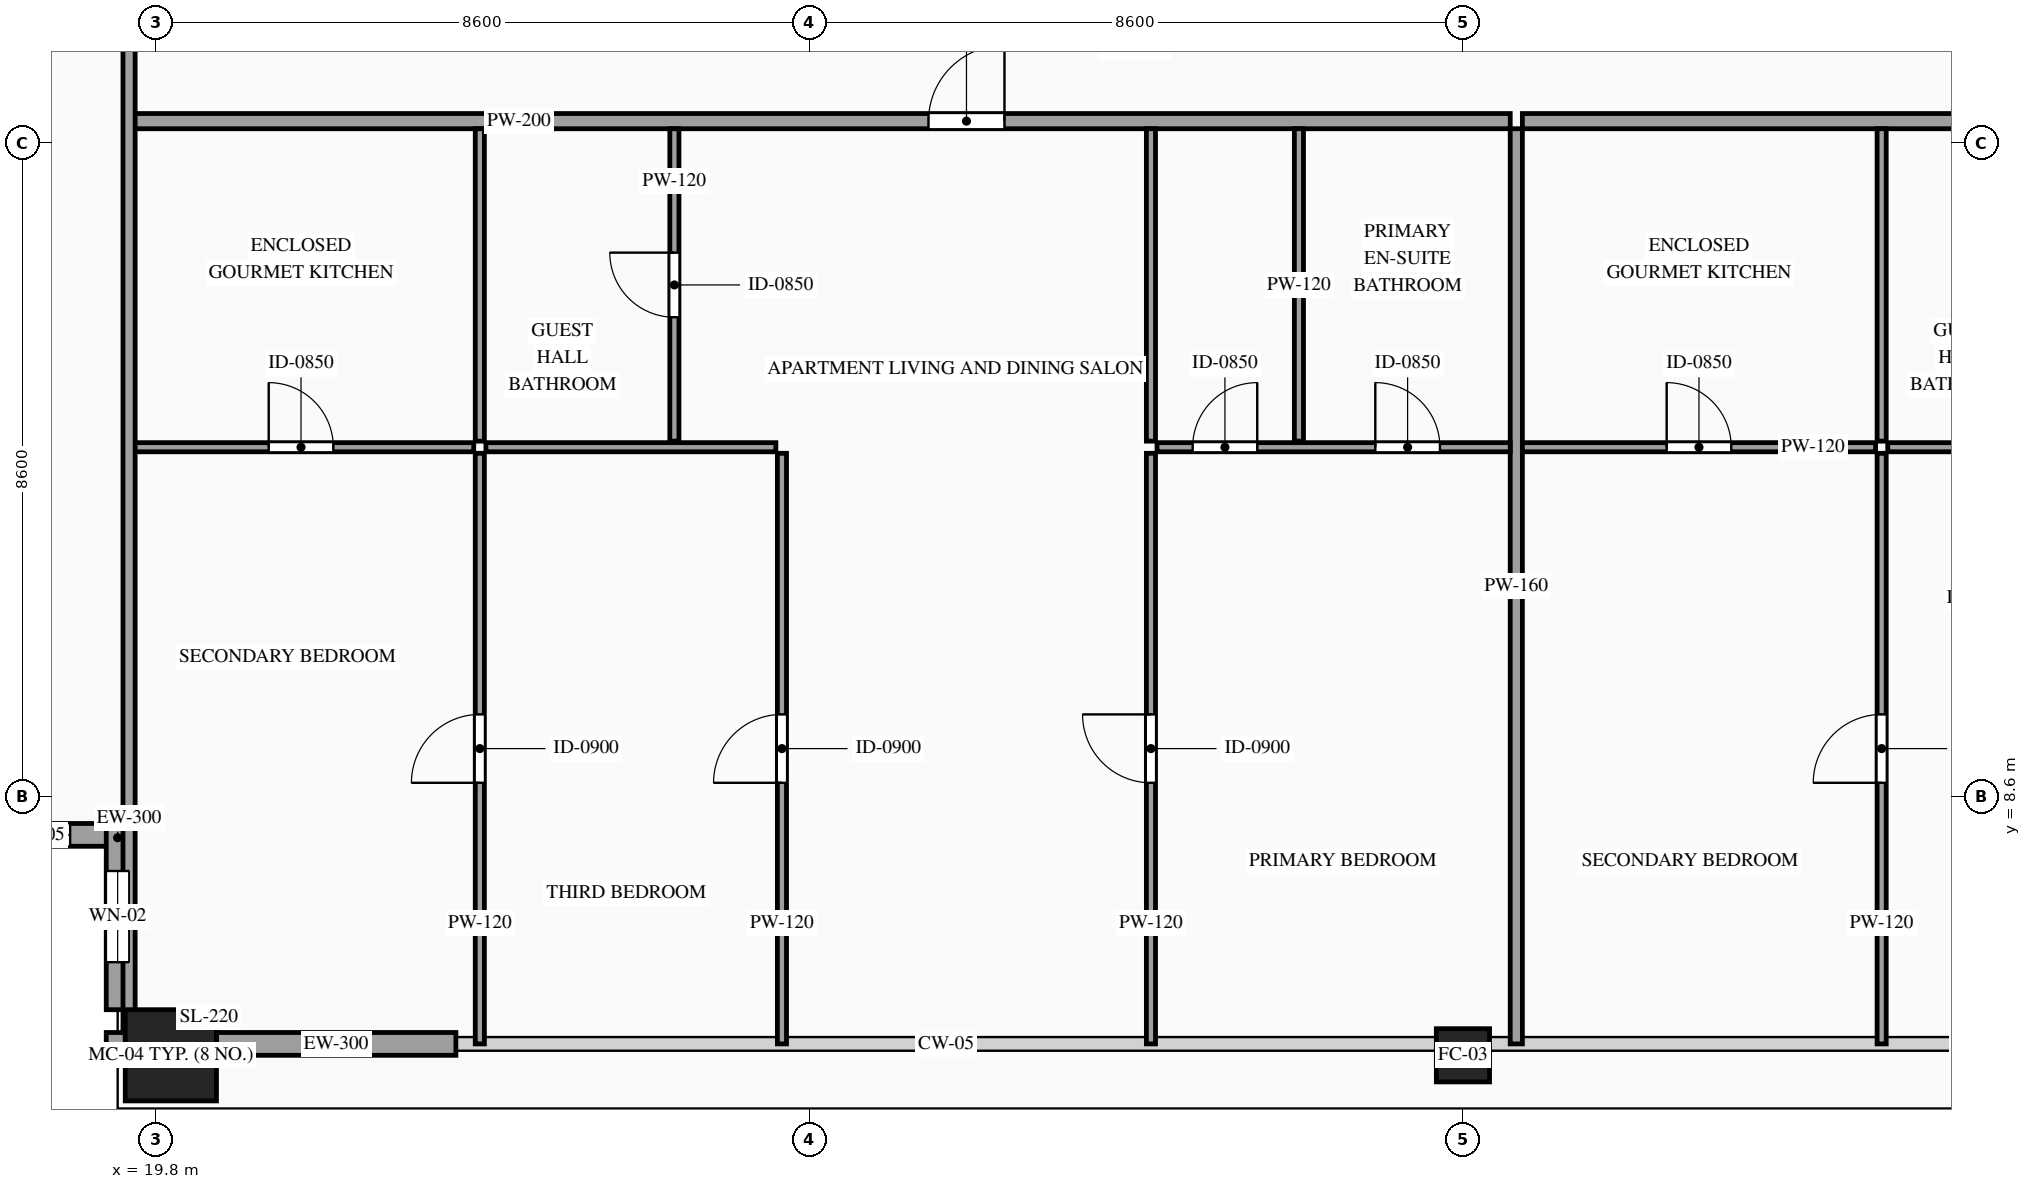
"""IFC4 building model, lengths in metres.
Left out: names, types, materials, properties, quantities, classifications, styles, units other than length and angle.
Written with IfcOpenShell. Run it as: python <this file> out.ifc"""

import sys

from ifc_helpers import new_model, si_unit, direction, frame, frame_2d, origin, origin_2d, place, context, subcontext, project, spatial, rectangle, hollow_rectangle, extrude, source, transform, mapped, element, fill, save


model = new_model("IFC4")
c1 = context("Model", 3, precision=1e-05, world=origin(), true_north=direction((0.0, 1.0)))
c2 = subcontext(c1, "Body", "Model", "MODEL_VIEW")
j1 = project(units=[si_unit("LENGTHUNIT", "METRE"), si_unit("PLANEANGLEUNIT", "RADIAN")], contexts=[c1])
p1 = place(None, origin())
s1 = spatial("IfcSite", under=j1, at=p1, CompositionType="ELEMENT")
p2 = place(p1, origin())
s2 = spatial("IfcBuilding", under=s1, at=p2, CompositionType="ELEMENT")
p3 = place(p2, frame((0.0, 0.0, 224.1)))
s3 = spatial("IfcBuildingStorey", under=s2, at=p3, CompositionType="ELEMENT", Elevation=224.1)
m1 = source(origin(), c2, "Body", "SweptSolid", [
    extrude(hollow_rectangle(XDim=1.2, YDim=1.2, WallThickness=0.055, at=origin_2d()), origin(), (0.0, 0.0, 1.0), 3.5),
])
p4 = place(p3, frame((20.0, 5.2, 0.0), z_axis=(0.0, 0.0, 1.0), x_axis=(1.0, 0.0, 0.0)))
e1 = element("IfcColumn", 1, at=p4, inside=s3, PredefinedType="COLUMN", context=c2, shape_type="MappedRepresentation", body=[
    mapped(m1, transform((0.0, 0.0, 0.0), scale=1.0)),
])
m2 = source(origin(), c2, "Body", "SweptSolid", [
    extrude(hollow_rectangle(XDim=0.7, YDim=0.7, WallThickness=0.032, at=origin_2d()), origin(), (0.0, 0.0, 1.0), 3.5),
])
p5 = place(p3, frame((37.0, 5.2, 0.0), z_axis=(0.0, 0.0, 1.0), x_axis=(1.0, 0.0, 0.0)))
e2 = element("IfcColumn", 2, at=p5, inside=s3, PredefinedType="COLUMN", context=c2, shape_type="MappedRepresentation", body=[
    mapped(m2, transform((0.0, 0.0, 0.0), scale=1.0)),
])
p6 = place(p3, frame((17.0, 8.1, 0.0), z_axis=(0.0, 0.0, 1.0), x_axis=(1.0, 0.0, 0.0)))
e3 = element("IfcWall", 3, at=p6, inside=s3, PredefinedType="SOLIDWALL", context=c2, shape_type="SweptSolid", body=[
    extrude(rectangle(XDim=2.45, YDim=0.3, at=frame_2d((1.225, 0.0))), origin(), (0.0, 0.0, 1.0), 3.28),
])
p7 = place(p6, frame((0.775, 0.0, 0.85)))
e4 = element("IfcOpeningElement", 4, at=p7, cuts=e3, PredefinedType="OPENING", context=c2, shape_type="SweptSolid", body=[
    extrude(rectangle(XDim=0.9, YDim=1.5, at=frame_2d((0.45, 0.75))), frame((0.0, 0.165, 0.0), z_axis=(0.0, -1.0, 0.0), x_axis=(1.0, 0.0, 0.0)), (0.0, 0.0, 1.0), 0.33),
])
p8 = place(p3, frame((19.3, 8.25, 0.0), z_axis=(0.0, 0.0, 1.0), x_axis=(0.0, -1.0, 0.0)))
e5 = element("IfcWall", 5, at=p8, inside=s3, PredefinedType="SOLIDWALL", context=c2, shape_type="SweptSolid", body=[
    extrude(rectangle(XDim=2.45, YDim=0.3, at=frame_2d((1.225, 0.0))), origin(), (0.0, 0.0, 1.0), 3.28),
])
p9 = place(p8, frame((0.625, 0.0, 0.85)))
e6 = element("IfcOpeningElement", 6, at=p9, cuts=e5, PredefinedType="OPENING", context=c2, shape_type="SweptSolid", body=[
    extrude(rectangle(XDim=1.2, YDim=2.1, at=frame_2d((0.6, 1.05))), frame((0.0, 0.165, 0.0), z_axis=(0.0, -1.0, 0.0), x_axis=(1.0, 0.0, 0.0)), (0.0, 0.0, 1.0), 0.33),
])
m3 = source(origin(), c2, "Body", "SweptSolid", [
    extrude(rectangle(XDim=0.25, YDim=0.3, at=frame_2d((0.125, 0.0))), origin(), (0.0, 0.0, 1.0), 3.28),
])
p10 = place(p3, frame((19.15, 5.35, 0.0), z_axis=(0.0, 0.0, 1.0), x_axis=(1.0, 0.0, 0.0)))
e7 = element("IfcWall", 7, at=p10, inside=s3, PredefinedType="SOLIDWALL", context=c2, shape_type="MappedRepresentation", body=[
    mapped(m3, transform((0.0, 0.0, 0.0), scale=1.0)),
])
m4 = source(origin(), c2, "Body", "SweptSolid", [
    extrude(rectangle(XDim=3.15, YDim=0.3, at=frame_2d((1.575, 0.0))), origin(), (0.0, 0.0, 1.0), 2.835),
])
p11 = place(p3, frame((20.6, 5.35, 0.0), z_axis=(0.0, 0.0, 1.0), x_axis=(1.0, 0.0, 0.0)))
e8 = element("IfcWall", 8, at=p11, inside=s3, PredefinedType="SOLIDWALL", context=c2, shape_type="MappedRepresentation", body=[
    mapped(m4, transform((0.0, 0.0, 0.0), scale=1.0)),
])
p12 = place(p3, frame((19.44, 17.49, 0.0), z_axis=(0.0, 0.0, 1.0), x_axis=(1.0, 0.0, 0.0)))
e9 = element("IfcWall", 9, at=p12, inside=s3, PredefinedType="PARTITIONING", context=c2, shape_type="SweptSolid", body=[
    extrude(rectangle(XDim=18.182, YDim=0.2, at=frame_2d((9.091, 0.0))), origin(), (0.0, 0.0, 1.0), 3.28),
])
p13 = place(p12, frame((10.528, 0.0, 0.0)))
e10 = element("IfcOpeningElement", 10, at=p13, cuts=e9, PredefinedType="OPENING", context=c2, shape_type="SweptSolid", body=[
    extrude(rectangle(XDim=1.0, YDim=2.2, at=frame_2d((0.5, 1.1))), frame((0.0, 0.115, 0.0), z_axis=(0.0, -1.0, 0.0), x_axis=(1.0, 0.0, 0.0)), (0.0, 0.0, 1.0), 0.23),
])
m5 = source(origin(), c2, "Body", "SweptSolid", [
    extrude(rectangle(XDim=12.04, YDim=0.16, at=frame_2d((6.02, 0.0))), origin(), (0.0, 0.0, 1.0), 3.28),
])
p14 = place(p3, frame((37.702, 5.35, 0.0), z_axis=(0.0, 0.0, 1.0), x_axis=(0.0, 1.0, 0.0)))
e11 = element("IfcWall", 11, at=p14, inside=s3, PredefinedType="PARTITIONING", context=c2, shape_type="MappedRepresentation", body=[
    mapped(m5, transform((0.0, 0.0, 0.0), scale=1.0)),
])
p15 = place(p3, frame((19.44, 13.2, 0.0), z_axis=(0.0, 0.0, 1.0), x_axis=(1.0, 0.0, 0.0)))
e12 = element("IfcWall", 12, at=p15, inside=s3, PredefinedType="PARTITIONING", context=c2, shape_type="SweptSolid", body=[
    extrude(rectangle(XDim=4.545, YDim=0.12, at=frame_2d((2.272, 0.0))), origin(), (0.0, 0.0, 1.0), 3.28),
])
p16 = place(p15, frame((1.847, 0.0, 0.0)))
e13 = element("IfcOpeningElement", 13, at=p16, cuts=e12, PredefinedType="OPENING", context=c2, shape_type="SweptSolid", body=[
    extrude(rectangle(XDim=0.85, YDim=2.1, at=frame_2d((0.425, 1.05))), frame((0.0, 0.075, 0.0), z_axis=(0.0, -1.0, 0.0), x_axis=(1.0, 0.0, 0.0)), (0.0, 0.0, 1.0), 0.15),
])
m6 = source(origin(), c2, "Body", "SweptSolid", [
    extrude(rectangle(XDim=4.11, YDim=0.12, at=frame_2d((2.055, 0.0))), origin(), (0.0, 0.0, 1.0), 3.28),
])
p17 = place(p3, frame((24.065, 13.28, 0.0), z_axis=(0.0, 0.0, 1.0), x_axis=(0.0, 1.0, 0.0)))
e14 = element("IfcWall", 14, at=p17, inside=s3, PredefinedType="PARTITIONING", context=c2, shape_type="MappedRepresentation", body=[
    mapped(m6, transform((0.0, 0.0, 0.0), scale=1.0)),
])
p18 = place(p3, frame((26.625, 13.28, 0.0), z_axis=(0.0, 0.0, 1.0), x_axis=(0.0, 1.0, 0.0)))
e15 = element("IfcWall", 15, at=p18, inside=s3, PredefinedType="PARTITIONING", context=c2, shape_type="SweptSolid", body=[
    extrude(rectangle(XDim=4.11, YDim=0.12, at=frame_2d((2.055, 0.0))), origin(), (0.0, 0.0, 1.0), 3.28),
])
p19 = place(p18, frame((1.63, 0.0, 0.0)))
e16 = element("IfcOpeningElement", 16, at=p19, cuts=e15, PredefinedType="OPENING", context=c2, shape_type="SweptSolid", body=[
    extrude(rectangle(XDim=0.85, YDim=2.1, at=frame_2d((0.425, 1.05))), frame((0.0, 0.075, 0.0), z_axis=(0.0, -1.0, 0.0), x_axis=(1.0, 0.0, 0.0)), (0.0, 0.0, 1.0), 0.15),
])
for number, where, z_axis, x_axis in (
    (17, (34.842, 13.28, 0.0), (0.0, 0.0, 1.0), (0.0, 1.0, 0.0)),
    (18, (32.895, 13.28, 0.0), (0.0, 0.0, 1.0), (0.0, 1.0, 0.0)),
):
    element("IfcWall", number, at=place(p3, frame(where, z_axis=z_axis, x_axis=x_axis)), inside=s3, PredefinedType="PARTITIONING", context=c2, shape_type="MappedRepresentation", body=[
        mapped(m6, transform((0.0, 0.0, 0.0), scale=1.0)),
    ])
p20 = place(p3, frame((24.065, 5.35, 0.0), z_axis=(0.0, 0.0, 1.0), x_axis=(0.0, 1.0, 0.0)))
e19 = element("IfcWall", 19, at=p20, inside=s3, PredefinedType="PARTITIONING", context=c2, shape_type="SweptSolid", body=[
    extrude(rectangle(XDim=7.77, YDim=0.12, at=frame_2d((3.885, 0.0))), origin(), (0.0, 0.0, 1.0), 3.28),
])
p21 = place(p20, frame((3.435, 0.0, 0.0)))
e20 = element("IfcOpeningElement", 20, at=p21, cuts=e19, PredefinedType="OPENING", context=c2, shape_type="SweptSolid", body=[
    extrude(rectangle(XDim=0.9, YDim=2.15, at=frame_2d((0.45, 1.075))), frame((0.0, 0.075, 0.0), z_axis=(0.0, -1.0, 0.0), x_axis=(1.0, 0.0, 0.0)), (0.0, 0.0, 1.0), 0.15),
])
p22 = place(p3, frame((32.975, 13.2, 0.0), z_axis=(0.0, 0.0, 1.0), x_axis=(1.0, 0.0, 0.0)))
e21 = element("IfcWall", 21, at=p22, inside=s3, PredefinedType="PARTITIONING", context=c2, shape_type="SweptSolid", body=[
    extrude(rectangle(XDim=4.647, YDim=0.12, at=frame_2d((2.323, 0.0))), origin(), (0.0, 0.0, 1.0), 3.28),
])
p23 = place(p22, frame((2.872, 0.0, 0.0)))
e22 = element("IfcOpeningElement", 22, at=p23, cuts=e21, PredefinedType="OPENING", context=c2, shape_type="SweptSolid", body=[
    extrude(rectangle(XDim=0.85, YDim=2.1, at=frame_2d((0.425, 1.05))), frame((0.0, 0.075, 0.0), z_axis=(0.0, -1.0, 0.0), x_axis=(1.0, 0.0, 0.0)), (0.0, 0.0, 1.0), 0.15),
])
p24 = place(p22, frame((0.469, 0.0, 0.0)))
e23 = element("IfcOpeningElement", 23, at=p24, cuts=e21, PredefinedType="OPENING", context=c2, shape_type="SweptSolid", body=[
    extrude(rectangle(XDim=0.85, YDim=2.1, at=frame_2d((0.425, 1.05))), frame((0.0, 0.075, 0.0), z_axis=(0.0, -1.0, 0.0), x_axis=(1.0, 0.0, 0.0)), (0.0, 0.0, 1.0), 0.15),
])
p25 = place(p3, frame((32.895, 5.35, 0.0), z_axis=(0.0, 0.0, 1.0), x_axis=(0.0, 1.0, 0.0)))
e24 = element("IfcWall", 24, at=p25, inside=s3, PredefinedType="PARTITIONING", context=c2, shape_type="SweptSolid", body=[
    extrude(rectangle(XDim=7.77, YDim=0.12, at=frame_2d((3.885, 0.0))), origin(), (0.0, 0.0, 1.0), 3.28),
])
p26 = place(p25, frame((3.435, 0.0, 0.0)))
e25 = element("IfcOpeningElement", 25, at=p26, cuts=e24, PredefinedType="OPENING", context=c2, shape_type="SweptSolid", body=[
    extrude(rectangle(XDim=0.9, YDim=2.15, at=frame_2d((0.45, 1.075))), frame((0.0, 0.075, 0.0), z_axis=(0.0, -1.0, 0.0), x_axis=(1.0, 0.0, 0.0)), (0.0, 0.0, 1.0), 0.15),
])
m7 = source(origin(), c2, "Body", "SweptSolid", [
    extrude(rectangle(XDim=3.815, YDim=0.12, at=frame_2d((1.907, 0.0))), origin(), (0.0, 0.0, 1.0), 3.28),
])
p27 = place(p3, frame((24.145, 13.2, 0.0), z_axis=(0.0, 0.0, 1.0), x_axis=(1.0, 0.0, 0.0)))
e26 = element("IfcWall", 26, at=p27, inside=s3, PredefinedType="PARTITIONING", context=c2, shape_type="MappedRepresentation", body=[
    mapped(m7, transform((0.0, 0.0, 0.0), scale=1.0)),
])
p28 = place(p3, frame((28.04, 5.35, 0.0), z_axis=(0.0, 0.0, 1.0), x_axis=(0.0, 1.0, 0.0)))
e27 = element("IfcWall", 27, at=p28, inside=s3, PredefinedType="PARTITIONING", context=c2, shape_type="SweptSolid", body=[
    extrude(rectangle(XDim=7.77, YDim=0.12, at=frame_2d((3.885, 0.0))), origin(), (0.0, 0.0, 1.0), 3.28),
])
p29 = place(p28, frame((3.435, 0.0, 0.0)))
e28 = element("IfcOpeningElement", 28, at=p29, cuts=e27, PredefinedType="OPENING", context=c2, shape_type="SweptSolid", body=[
    extrude(rectangle(XDim=0.9, YDim=2.15, at=frame_2d((0.45, 1.075))), frame((0.0, 0.075, 0.0), z_axis=(0.0, -1.0, 0.0), x_axis=(1.0, 0.0, 0.0)), (0.0, 0.0, 1.0), 0.15),
])
p30 = place(p3, frame((37.782, 17.49, 0.0), z_axis=(0.0, 0.0, 1.0), x_axis=(1.0, 0.0, 0.0)))
e29 = element("IfcWall", 29, at=p30, inside=s3, PredefinedType="PARTITIONING", context=c2, shape_type="SweptSolid", body=[
    extrude(rectangle(XDim=16.778, YDim=0.2, at=frame_2d((8.389, 0.0))), origin(), (0.0, 0.0, 1.0), 3.28),
])
p31 = place(p30, frame((9.545, 0.0, 0.0)))
e30 = element("IfcOpeningElement", 30, at=p31, cuts=e29, PredefinedType="OPENING", context=c2, shape_type="SweptSolid", body=[
    extrude(rectangle(XDim=1.0, YDim=2.2, at=frame_2d((0.5, 1.1))), frame((0.0, 0.115, 0.0), z_axis=(0.0, -1.0, 0.0), x_axis=(1.0, 0.0, 0.0)), (0.0, 0.0, 1.0), 0.23),
])
p32 = place(p3, frame((37.782, 13.2, 0.0), z_axis=(0.0, 0.0, 1.0), x_axis=(1.0, 0.0, 0.0)))
e31 = element("IfcWall", 31, at=p32, inside=s3, PredefinedType="PARTITIONING", context=c2, shape_type="SweptSolid", body=[
    extrude(rectangle(XDim=4.647, YDim=0.12, at=frame_2d((2.323, 0.0))), origin(), (0.0, 0.0, 1.0), 3.28),
])
p33 = place(p32, frame((1.898, 0.0, 0.0)))
e32 = element("IfcOpeningElement", 32, at=p33, cuts=e31, PredefinedType="OPENING", context=c2, shape_type="SweptSolid", body=[
    extrude(rectangle(XDim=0.85, YDim=2.1, at=frame_2d((0.425, 1.05))), frame((0.0, 0.075, 0.0), z_axis=(0.0, -1.0, 0.0), x_axis=(1.0, 0.0, 0.0)), (0.0, 0.0, 1.0), 0.15),
])
p34 = place(p3, frame((42.509, 13.28, 0.0), z_axis=(0.0, 0.0, 1.0), x_axis=(0.0, 1.0, 0.0)))
e33 = element("IfcWall", 33, at=p34, inside=s3, PredefinedType="PARTITIONING", context=c2, shape_type="MappedRepresentation", body=[
    mapped(m6, transform((0.0, 0.0, 0.0), scale=1.0)),
])
p35 = place(p3, frame((42.509, 5.35, 0.0), z_axis=(0.0, 0.0, 1.0), x_axis=(0.0, 1.0, 0.0)))
e34 = element("IfcWall", 34, at=p35, inside=s3, PredefinedType="PARTITIONING", context=c2, shape_type="SweptSolid", body=[
    extrude(rectangle(XDim=7.77, YDim=0.12, at=frame_2d((3.885, 0.0))), origin(), (0.0, 0.0, 1.0), 3.28),
])
p36 = place(p35, frame((3.435, 0.0, 0.0)))
e35 = element("IfcOpeningElement", 35, at=p36, cuts=e34, PredefinedType="OPENING", context=c2, shape_type="SweptSolid", body=[
    extrude(rectangle(XDim=0.9, YDim=2.15, at=frame_2d((0.45, 1.075))), frame((0.0, 0.075, 0.0), z_axis=(0.0, -1.0, 0.0), x_axis=(1.0, 0.0, 0.0)), (0.0, 0.0, 1.0), 0.15),
])
m8 = source(origin(), c2, "Body", "SweptSolid", [
    extrude(rectangle(XDim=3.152, YDim=0.12, at=frame_2d((1.576, 0.0))), origin(), (0.0, 0.0, 1.0), 3.28),
])
p37 = place(p3, frame((42.589, 13.2, 0.0), z_axis=(0.0, 0.0, 1.0), x_axis=(1.0, 0.0, 0.0)))
e36 = element("IfcWall", 36, at=p37, inside=s3, PredefinedType="PARTITIONING", context=c2, shape_type="MappedRepresentation", body=[
    mapped(m8, transform((0.0, 0.0, 0.0), scale=1.0)),
])
m9 = source(origin(), c2, "Body", "SweptSolid", [
    extrude(rectangle(XDim=26.69, YDim=0.16, at=frame_2d((13.345, 0.0))), origin(), (0.0, 0.0, 1.0), 3.28),
])
p38 = place(p3, frame((19.45, 5.5, 0.0), z_axis=(0.0, 0.0, 1.0), x_axis=(0.0, 1.0, 0.0)))
e37 = element("IfcWall", 37, at=p38, inside=s3, PredefinedType="PARTITIONING", context=c2, shape_type="MappedRepresentation", body=[
    mapped(m9, transform((0.0, 0.0, 0.0), scale=1.0)),
])
m10 = source(origin(), c2, "Body", "SweptSolid", [
    extrude(rectangle(XDim=0.9, YDim=1.5, at=frame_2d((0.45, 0.75))), frame((0.0, 0.03, 0.0), z_axis=(0.0, -1.0, 0.0), x_axis=(1.0, 0.0, 0.0)), (0.0, 0.0, 1.0), 0.06),
])
p39 = place(p7, origin())
e38 = element("IfcWindow", 38, at=p39, inside=s3, PartitioningType="SINGLE_PANEL", PredefinedType="WINDOW", context=c2, shape_type="MappedRepresentation", body=[
    mapped(m10, transform((0.0, 0.0, 0.0), scale=1.0)),
])
fill(e4, e38)
m11 = source(origin(), c2, "Body", "SweptSolid", [
    extrude(rectangle(XDim=1.2, YDim=2.1, at=frame_2d((0.6, 1.05))), frame((0.0, 0.03, 0.0), z_axis=(0.0, -1.0, 0.0), x_axis=(1.0, 0.0, 0.0)), (0.0, 0.0, 1.0), 0.06),
])
p40 = place(p9, origin())
e39 = element("IfcWindow", 39, at=p40, inside=s3, PartitioningType="SINGLE_PANEL", PredefinedType="WINDOW", context=c2, shape_type="MappedRepresentation", body=[
    mapped(m11, transform((0.0, 0.0, 0.0), scale=1.0)),
])
fill(e6, e39)
m12 = source(origin(), c2, "Body", "SweptSolid", [
    extrude(rectangle(XDim=1.0, YDim=2.2, at=frame_2d((0.5, 1.1))), frame((0.0, 0.025, 0.0), z_axis=(0.0, -1.0, 0.0), x_axis=(1.0, 0.0, 0.0)), (0.0, 0.0, 1.0), 0.05),
])
p41 = place(p13, origin())
e40 = element("IfcDoor", 40, at=p41, inside=s3, OperationType="SINGLE_SWING_RIGHT", PredefinedType="DOOR", context=c2, shape_type="MappedRepresentation", body=[
    mapped(m12, transform((0.0, 0.0, 0.0), scale=1.0)),
])
fill(e10, e40)
m13 = source(origin(), c2, "Body", "SweptSolid", [
    extrude(rectangle(XDim=0.85, YDim=2.1, at=frame_2d((0.425, 1.05))), frame((0.0, 0.025, 0.0), z_axis=(0.0, -1.0, 0.0), x_axis=(1.0, 0.0, 0.0)), (0.0, 0.0, 1.0), 0.05),
])
p42 = place(p16, origin())
e41 = element("IfcDoor", 41, at=p42, inside=s3, OperationType="SINGLE_SWING_LEFT", PredefinedType="DOOR", context=c2, shape_type="MappedRepresentation", body=[
    mapped(m13, transform((0.0, 0.0, 0.0), scale=1.0)),
])
fill(e13, e41)
p43 = place(p19, origin())
e42 = element("IfcDoor", 42, at=p43, inside=s3, OperationType="SINGLE_SWING_RIGHT", PredefinedType="DOOR", context=c2, shape_type="MappedRepresentation", body=[
    mapped(m13, transform((0.0, 0.0, 0.0), scale=1.0)),
])
fill(e16, e42)
p44 = place(p23, origin())
e43 = element("IfcDoor", 43, at=p44, inside=s3, OperationType="SINGLE_SWING_LEFT", PredefinedType="DOOR", context=c2, shape_type="MappedRepresentation", body=[
    mapped(m13, transform((0.0, 0.0, 0.0), scale=1.0)),
])
fill(e22, e43)
p45 = place(p24, origin())
e44 = element("IfcDoor", 44, at=p45, inside=s3, OperationType="SINGLE_SWING_RIGHT", PredefinedType="DOOR", context=c2, shape_type="MappedRepresentation", body=[
    mapped(m13, transform((0.0, 0.0, 0.0), scale=1.0)),
])
fill(e23, e44)
m14 = source(origin(), c2, "Body", "SweptSolid", [
    extrude(rectangle(XDim=0.9, YDim=2.15, at=frame_2d((0.45, 1.075))), frame((0.0, 0.025, 0.0), z_axis=(0.0, -1.0, 0.0), x_axis=(1.0, 0.0, 0.0)), (0.0, 0.0, 1.0), 0.05),
])
p46 = place(p21, origin())
e45 = element("IfcDoor", 45, at=p46, inside=s3, OperationType="SINGLE_SWING_LEFT", PredefinedType="DOOR", context=c2, shape_type="MappedRepresentation", body=[
    mapped(m14, transform((0.0, 0.0, 0.0), scale=1.0)),
])
fill(e20, e45)
p47 = place(p26, origin())
e46 = element("IfcDoor", 46, at=p47, inside=s3, OperationType="SINGLE_SWING_RIGHT", PredefinedType="DOOR", context=c2, shape_type="MappedRepresentation", body=[
    mapped(m14, transform((0.0, 0.0, 0.0), scale=1.0)),
])
fill(e25, e46)
p48 = place(p29, origin())
e47 = element("IfcDoor", 47, at=p48, inside=s3, OperationType="SINGLE_SWING_LEFT", PredefinedType="DOOR", context=c2, shape_type="MappedRepresentation", body=[
    mapped(m14, transform((0.0, 0.0, 0.0), scale=1.0)),
])
fill(e28, e47)
p49 = place(p33, origin())
e48 = element("IfcDoor", 48, at=p49, inside=s3, OperationType="SINGLE_SWING_LEFT", PredefinedType="DOOR", context=c2, shape_type="MappedRepresentation", body=[
    mapped(m13, transform((0.0, 0.0, 0.0), scale=1.0)),
])
fill(e32, e48)
p50 = place(p36, origin())
e49 = element("IfcDoor", 49, at=p50, inside=s3, OperationType="SINGLE_SWING_LEFT", PredefinedType="DOOR", context=c2, shape_type="MappedRepresentation", body=[
    mapped(m14, transform((0.0, 0.0, 0.0), scale=1.0)),
])
fill(e35, e49)
save(model, sys.argv[1])
